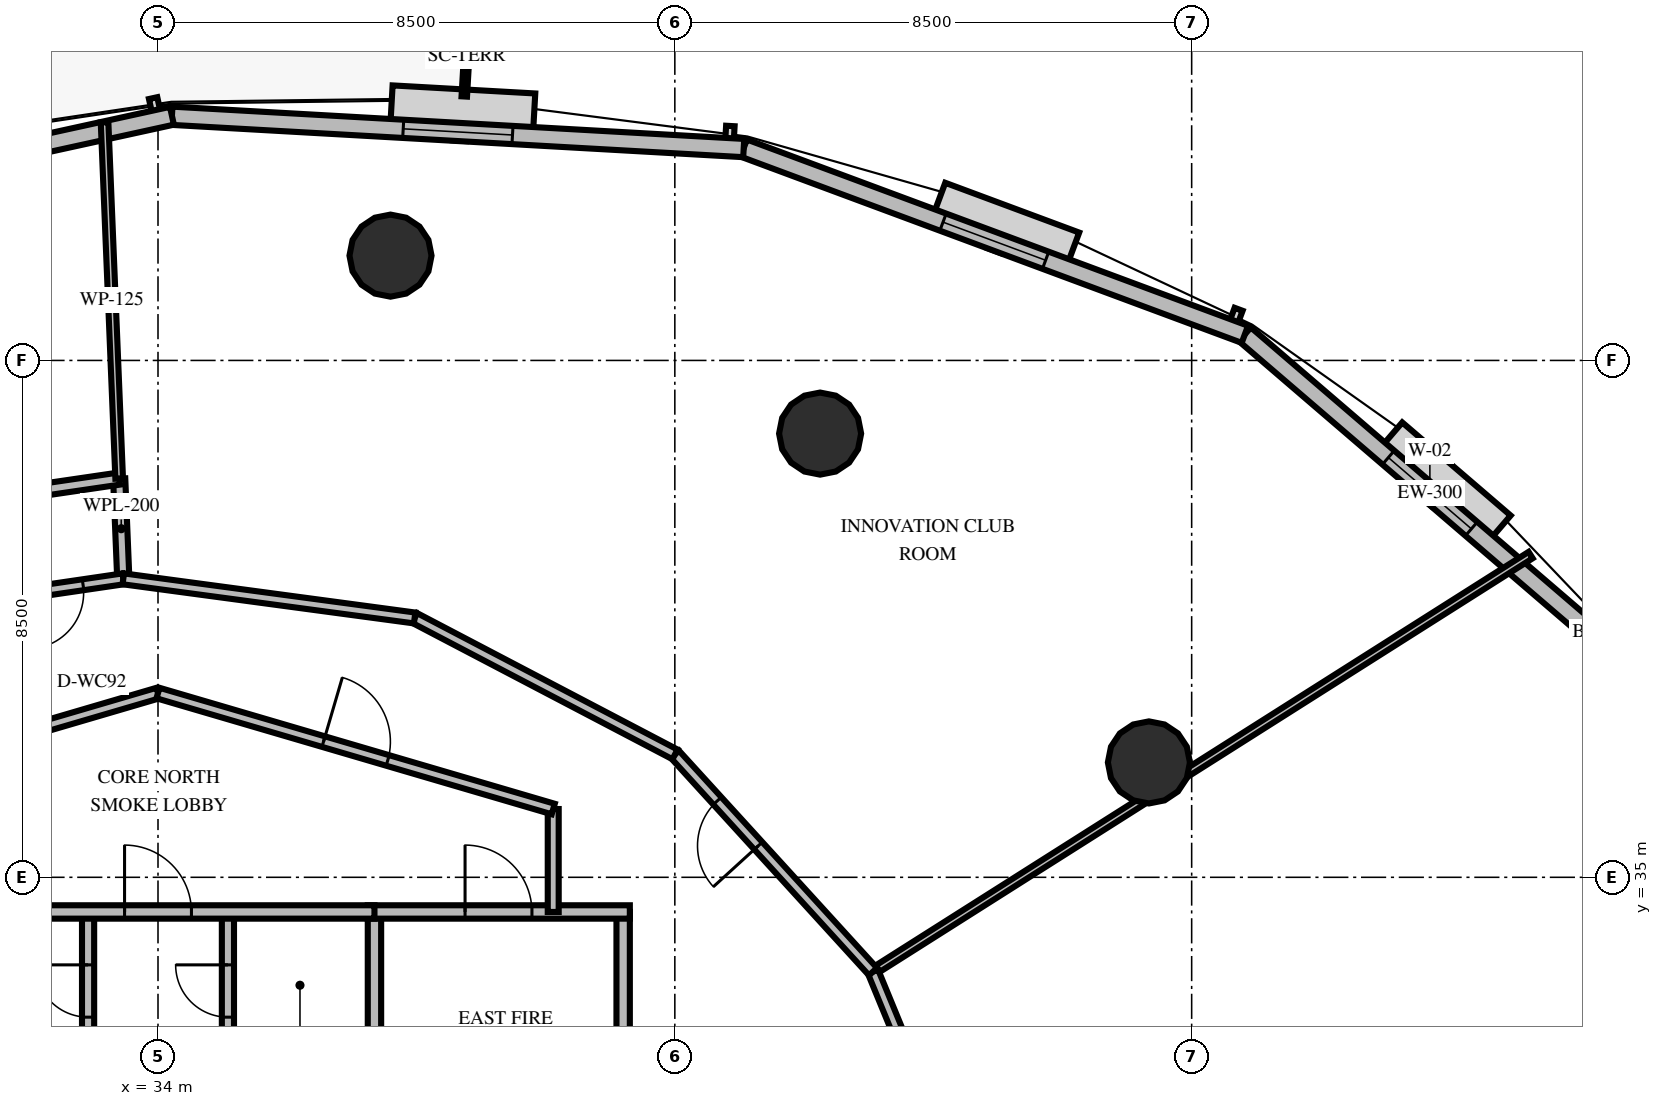
"""IFC4 building model, lengths in metres.
Left out: names, types, materials, properties, quantities, classifications, styles, units other than length and angle.
Written with IfcOpenShell. Run it as: python <this file> out.ifc"""

import sys

from ifc_helpers import new_model, si_unit, direction, frame, frame_2d, origin, origin_2d, place, context, subcontext, project, spatial, rectangle, circle, extrude, element, fill, save


model = new_model("IFC4")
c1 = context("Model", 3, precision=1e-05, world=origin(), true_north=direction((0.0, 1.0)))
c2 = subcontext(c1, "Body", "Model", "MODEL_VIEW")
j1 = project(units=[si_unit("LENGTHUNIT", "METRE"), si_unit("PLANEANGLEUNIT", "RADIAN")], contexts=[c1])
p1 = place(None, origin())
s1 = spatial("IfcSite", under=j1, at=p1, CompositionType="ELEMENT")
p2 = place(p1, origin())
s2 = spatial("IfcBuilding", under=s1, at=p2, CompositionType="ELEMENT")
p3 = place(p2, frame((0.0, 0.0, 84.6)))
s3 = spatial("IfcBuildingStorey", under=s2, at=p3, CompositionType="ELEMENT", Elevation=84.6)
for number, where, z_axis, x_axis in (
    (1, (50.297, 36.889, 0.0), (0.0, 0.0, 1.0), (1.0, 0.0, 0.0)),
    (2, (44.889, 42.297, 0.0), (0.0, 0.0, 1.0), (1.0, 0.0, 0.0)),
    (3, (37.824, 45.223, 0.0), (0.0, 0.0, 1.0), (1.0, 0.0, 0.0)),
):
    element("IfcColumn", number, at=place(p3, frame(where, z_axis=z_axis, x_axis=x_axis)), inside=s3, PredefinedType="COLUMN", context=c2, shape_type="SweptSolid", body=[
        extrude(circle(Radius=0.675, at=origin_2d()), origin(), (0.0, 0.0, 1.0), 4.2),
    ])
p4 = place(p3, frame((57.961, 38.704, 0.0), z_axis=(0.0, 0.0, 1.0), x_axis=(-0.758684823953, 0.651457855815, 0.0)))
e4 = element("IfcWall", 4, at=p4, inside=s3, PredefinedType="SOLIDWALL", context=c2, shape_type="SweptSolid", body=[
    extrude(rectangle(XDim=8.021, YDim=0.3, at=frame_2d((4.011, 0.0))), origin(), (0.0, 0.0, 1.0), 2.96),
])
p5 = place(p4, frame((3.111, 0.0, 0.8)))
e5 = element("IfcOpeningElement", 5, at=p5, cuts=e4, PredefinedType="OPENING", context=c2, shape_type="SweptSolid", body=[
    extrude(rectangle(XDim=1.8, YDim=1.95, at=frame_2d((0.9, 0.975))), frame((0.0, 0.16, 0.0), z_axis=(0.0, -1.0, 0.0), x_axis=(1.0, 0.0, 0.0)), (0.0, 0.0, 1.0), 0.32),
])
p6 = place(p3, frame((51.875, 43.929, 0.0), z_axis=(0.0, 0.0, 1.0), x_axis=(-0.937362334375, 0.348355930184, 0.0)))
e6 = element("IfcWall", 6, at=p6, inside=s3, PredefinedType="SOLIDWALL", context=c2, shape_type="SweptSolid", body=[
    extrude(rectangle(XDim=8.793, YDim=0.3, at=frame_2d((4.396, 0.0))), origin(), (0.0, 0.0, 1.0), 2.96),
])
p7 = place(p6, frame((3.496, 0.0, 0.8)))
e7 = element("IfcOpeningElement", 7, at=p7, cuts=e6, PredefinedType="OPENING", context=c2, shape_type="SweptSolid", body=[
    extrude(rectangle(XDim=1.8, YDim=1.95, at=frame_2d((0.9, 0.975))), frame((0.0, 0.16, 0.0), z_axis=(0.0, -1.0, 0.0), x_axis=(1.0, 0.0, 0.0)), (0.0, 0.0, 1.0), 0.32),
])
p8 = place(p3, frame((43.633, 46.992, 0.0), z_axis=(0.0, 0.0, 1.0), x_axis=(-0.998409535383, 0.056377297353, 0.0)))
e8 = element("IfcWall", 8, at=p8, inside=s3, PredefinedType="SOLIDWALL", context=c2, shape_type="SweptSolid", body=[
    extrude(rectangle(XDim=9.419, YDim=0.3, at=frame_2d((4.709, 0.0))), origin(), (0.0, 0.0, 1.0), 2.96),
])
p9 = place(p8, frame((3.809, 0.0, 0.8)))
e9 = element("IfcOpeningElement", 9, at=p9, cuts=e8, PredefinedType="OPENING", context=c2, shape_type="SweptSolid", body=[
    extrude(rectangle(XDim=1.8, YDim=1.95, at=frame_2d((0.9, 0.975))), frame((0.0, 0.16, 0.0), z_axis=(0.0, -1.0, 0.0), x_axis=(1.0, 0.0, 0.0)), (0.0, 0.0, 1.0), 0.32),
])
p10 = place(p3, frame((34.229, 47.523, 0.0), z_axis=(0.0, 0.0, 1.0), x_axis=(-0.97686057385, -0.213877112516, 0.0)))
e10 = element("IfcWall", 10, at=p10, inside=s3, PredefinedType="SOLIDWALL", context=c2, shape_type="SweptSolid", body=[
    extrude(rectangle(XDim=9.655, YDim=0.3, at=frame_2d((4.827, 0.0))), origin(), (0.0, 0.0, 1.0), 2.96),
])
p11 = place(p10, frame((8.03, 0.0, 0.0)))
e11 = element("IfcOpeningElement", 11, at=p11, cuts=e10, PredefinedType="OPENING", context=c2, shape_type="SweptSolid", body=[
    extrude(rectangle(XDim=1.05, YDim=2.15, at=frame_2d((0.525, 1.075))), frame((0.0, 0.16, 0.0), z_axis=(0.0, -1.0, 0.0), x_axis=(1.0, 0.0, 0.0)), (0.0, 0.0, 1.0), 0.32),
])
p12 = place(p3, frame((32.85, 30.05, 0.0), z_axis=(0.0, 0.0, 1.0), x_axis=(0.0, 1.0, 0.0)))
e12 = element("IfcWall", 12, at=p12, inside=s3, PredefinedType="SOLIDWALL", context=c2, shape_type="SweptSolid", body=[
    extrude(rectangle(XDim=4.38, YDim=0.2, at=frame_2d((2.19, 0.0))), origin(), (0.0, 0.0, 1.0), 2.96),
])
p13 = place(p12, frame((2.65, 0.0, 0.0)))
e13 = element("IfcOpeningElement", 13, at=p13, cuts=e12, PredefinedType="OPENING", context=c2, shape_type="SweptSolid", body=[
    extrude(rectangle(XDim=0.86, YDim=2.05, at=frame_2d((0.43, 1.025))), frame((0.0, 0.11, 0.0), z_axis=(0.0, -1.0, 0.0), x_axis=(1.0, 0.0, 0.0)), (0.0, 0.0, 1.0), 0.22),
])
p14 = place(p3, frame((37.56, 30.05, 0.0), z_axis=(0.0, 0.0, 1.0), x_axis=(0.0, 1.0, 0.0)))
e14 = element("IfcWall", 14, at=p14, inside=s3, PredefinedType="SOLIDWALL", context=c2, shape_type="SweptSolid", body=[
    extrude(rectangle(XDim=4.38, YDim=0.22, at=frame_2d((2.19, 0.0))), origin(), (0.0, 0.0, 1.0), 2.96),
])
p15 = place(p14, frame((0.8, 0.0, 0.0)))
e15 = element("IfcOpeningElement", 15, at=p15, cuts=e14, PredefinedType="OPENING", context=c2, shape_type="SweptSolid", body=[
    extrude(rectangle(XDim=1.05, YDim=2.1, at=frame_2d((0.525, 1.05))), frame((0.0, 0.12, 0.0), z_axis=(0.0, -1.0, 0.0), x_axis=(1.0, 0.0, 0.0)), (0.0, 0.0, 1.0), 0.24),
])
p16 = place(p3, frame((41.65, 30.05, 0.0), z_axis=(0.0, 0.0, 1.0), x_axis=(0.0, 1.0, 0.0)))
e16 = element("IfcWall", 16, at=p16, inside=s3, PredefinedType="SOLIDWALL", context=c2, shape_type="SweptSolid", body=[
    extrude(rectangle(XDim=4.38, YDim=0.22, at=frame_2d((2.19, 0.0))), origin(), (0.0, 0.0, 1.0), 2.96),
])
p17 = place(p3, frame((37.45, 34.43, 0.0), z_axis=(0.0, 0.0, 1.0), x_axis=(1.0, 0.0, 0.0)))
e17 = element("IfcWall", 17, at=p17, inside=s3, PredefinedType="SOLIDWALL", context=c2, shape_type="SweptSolid", body=[
    extrude(rectangle(XDim=4.31, YDim=0.22, at=frame_2d((2.155, 0.0))), origin(), (0.0, 0.0, 1.0), 2.96),
])
p18 = place(p17, frame((1.6, 0.0, 0.0)))
e18 = element("IfcOpeningElement", 18, at=p18, cuts=e17, PredefinedType="OPENING", context=c2, shape_type="SweptSolid", body=[
    extrude(rectangle(XDim=1.1, YDim=2.15, at=frame_2d((0.55, 1.075))), frame((0.0, 0.12, 0.0), z_axis=(0.0, -1.0, 0.0), x_axis=(1.0, 0.0, 0.0)), (0.0, 0.0, 1.0), 0.24),
])
p19 = place(p3, frame((35.15, 30.05, 0.0), z_axis=(0.0, 0.0, 1.0), x_axis=(0.0, 1.0, 0.0)))
e19 = element("IfcWall", 19, at=p19, inside=s3, PredefinedType="SOLIDWALL", context=c2, shape_type="SweptSolid", body=[
    extrude(rectangle(XDim=4.38, YDim=0.2, at=frame_2d((2.19, 0.0))), origin(), (0.0, 0.0, 1.0), 2.96),
])
p20 = place(p19, frame((2.65, 0.0, 0.0)))
e20 = element("IfcOpeningElement", 20, at=p20, cuts=e19, PredefinedType="OPENING", context=c2, shape_type="SweptSolid", body=[
    extrude(rectangle(XDim=0.86, YDim=2.05, at=frame_2d((0.43, 1.025))), frame((0.0, 0.11, 0.0), z_axis=(0.0, -1.0, 0.0), x_axis=(1.0, 0.0, 0.0)), (0.0, 0.0, 1.0), 0.22),
])
p21 = place(p3, frame((30.44, 34.43, 0.0), z_axis=(0.0, 0.0, 1.0), x_axis=(1.0, 0.0, 0.0)))
e21 = element("IfcWall", 21, at=p21, inside=s3, PredefinedType="SOLIDWALL", context=c2, shape_type="SweptSolid", body=[
    extrude(rectangle(XDim=7.12, YDim=0.22, at=frame_2d((3.56, 0.0))), origin(), (0.0, 0.0, 1.0), 2.96),
])
p22 = place(p21, frame((3.01, 0.0, 0.0)))
e22 = element("IfcOpeningElement", 22, at=p22, cuts=e21, PredefinedType="OPENING", context=c2, shape_type="SweptSolid", body=[
    extrude(rectangle(XDim=1.1, YDim=2.15, at=frame_2d((0.55, 1.075))), frame((0.0, 0.12, 0.0), z_axis=(0.0, -1.0, 0.0), x_axis=(1.0, 0.0, 0.0)), (0.0, 0.0, 1.0), 0.24),
])
p23 = place(p3, frame((40.5, 36.123, 0.0), z_axis=(0.0, 0.0, 1.0), x_axis=(0.0, -1.0, 0.0)))
e23 = element("IfcWall", 23, at=p23, inside=s3, PredefinedType="PARTITIONING", context=c2, shape_type="SweptSolid", body=[
    extrude(rectangle(XDim=1.693, YDim=0.18, at=frame_2d((0.846, 0.0))), origin(), (0.0, 0.0, 1.0), 2.96),
])
p24 = place(p3, frame((27.5, 36.123, 0.0), z_axis=(0.0, 0.0, 1.0), x_axis=(0.959546654541, 0.281549671923, 0.0)))
e24 = element("IfcWall", 24, at=p24, inside=s3, PredefinedType="PARTITIONING", context=c2, shape_type="SweptSolid", body=[
    extrude(rectangle(XDim=6.774, YDim=0.18, at=frame_2d((3.387, 0.0))), origin(), (0.0, 0.0, 1.0), 2.96),
])
p25 = place(p24, frame((2.837, 0.0, 0.0)))
e25 = element("IfcOpeningElement", 25, at=p25, cuts=e24, PredefinedType="OPENING", context=c2, shape_type="SweptSolid", body=[
    extrude(rectangle(XDim=1.1, YDim=2.15, at=frame_2d((0.55, 1.075))), frame((0.0, 0.1, 0.0), z_axis=(0.0, -1.0, 0.0), x_axis=(1.0, 0.0, 0.0)), (0.0, 0.0, 1.0), 0.2),
])
p26 = place(p3, frame((34.0, 38.03, 0.0), z_axis=(0.0, 0.0, 1.0), x_axis=(0.959546654541, -0.281549671923, 0.0)))
e26 = element("IfcWall", 26, at=p26, inside=s3, PredefinedType="PARTITIONING", context=c2, shape_type="SweptSolid", body=[
    extrude(rectangle(XDim=6.774, YDim=0.18, at=frame_2d((3.387, 0.0))), origin(), (0.0, 0.0, 1.0), 2.96),
])
p27 = place(p26, frame((2.837, 0.0, 0.0)))
e27 = element("IfcOpeningElement", 27, at=p27, cuts=e26, PredefinedType="OPENING", context=c2, shape_type="SweptSolid", body=[
    extrude(rectangle(XDim=1.1, YDim=2.15, at=frame_2d((0.55, 1.075))), frame((0.0, 0.1, 0.0), z_axis=(0.0, -1.0, 0.0), x_axis=(1.0, 0.0, 0.0)), (0.0, 0.0, 1.0), 0.2),
])
p28 = place(p3, frame((33.429, 39.908, 0.0), z_axis=(0.0, 0.0, 1.0), x_axis=(-0.040984341999, 0.999159788878, 0.0)))
e28 = element("IfcWall", 28, at=p28, inside=s3, PredefinedType="PLUMBINGWALL", context=c2, shape_type="SweptSolid", body=[
    extrude(rectangle(XDim=1.65, YDim=0.2, at=frame_2d((0.825, 0.0))), origin(), (0.0, 0.0, 1.0), 2.96),
])
p29 = place(p3, frame((33.362, 41.557, 0.0), z_axis=(0.0, 0.0, 1.0), x_axis=(-0.989400694213, -0.145211109392, 0.0)))
e29 = element("IfcWall", 29, at=p29, inside=s3, PredefinedType="PLUMBINGWALL", context=c2, shape_type="SweptSolid", body=[
    extrude(rectangle(XDim=3.255, YDim=0.2, at=frame_2d((1.627, 0.0))), origin(), (0.0, 0.0, 1.0), 2.96),
])
p30 = place(p3, frame((33.429, 39.908, 0.0), z_axis=(0.0, 0.0, 1.0), x_axis=(-0.989398525704, -0.145225883829, 0.0)))
e30 = element("IfcWall", 30, at=p30, inside=s3, PredefinedType="PARTITIONING", context=c2, shape_type="SweptSolid", body=[
    extrude(rectangle(XDim=2.91, YDim=0.18, at=frame_2d((1.455, 0.0))), origin(), (0.0, 0.0, 1.0), 2.96),
])
p31 = place(p30, frame((0.669, 0.0, 0.0)))
e31 = element("IfcOpeningElement", 31, at=p31, cuts=e30, PredefinedType="OPENING", context=c2, shape_type="SweptSolid", body=[
    extrude(rectangle(XDim=0.92, YDim=2.1, at=frame_2d((0.46, 1.05))), frame((0.0, 0.1, 0.0), z_axis=(0.0, -1.0, 0.0), x_axis=(1.0, 0.0, 0.0)), (0.0, 0.0, 1.0), 0.2),
])
p32 = place(p3, frame((33.362, 41.557, 0.0), z_axis=(0.0, 0.0, 1.0), x_axis=(-0.041010556403, 0.99915871325, 0.0)))
e32 = element("IfcWall", 32, at=p32, inside=s3, PredefinedType="PARTITIONING", context=c2, shape_type="SweptSolid", body=[
    extrude(rectangle(XDim=5.864, YDim=0.125, at=frame_2d((2.932, 0.0))), origin(), (0.0, 0.0, 1.0), 2.96),
])
p33 = place(p3, frame((45.76, 33.448, 0.0), z_axis=(0.0, 0.0, 1.0), x_axis=(0.844793501384, 0.535092459318, 0.0)))
e33 = element("IfcWall", 33, at=p33, inside=s3, PredefinedType="PARTITIONING", context=c2, shape_type="SweptSolid", body=[
    extrude(rectangle(XDim=12.802, YDim=0.125, at=frame_2d((6.401, 0.0))), origin(), (0.0, 0.0, 1.0), 2.96),
])
p34 = place(p3, frame((47.598, 28.977, 0.0), z_axis=(0.0, 0.0, 1.0), x_axis=(-0.380272236521, 0.924874600219, 0.0)))
e34 = element("IfcWall", 34, at=p34, inside=s3, PredefinedType="PARTITIONING", context=c2, shape_type="SweptSolid", body=[
    extrude(rectangle(XDim=4.834, YDim=0.18, at=frame_2d((2.417, 0.0))), origin(), (0.0, 0.0, 1.0), 2.96),
])
p35 = place(p34, frame((1.917, 0.0, 0.0)))
e35 = element("IfcOpeningElement", 35, at=p35, cuts=e34, PredefinedType="OPENING", context=c2, shape_type="SweptSolid", body=[
    extrude(rectangle(XDim=1.0, YDim=2.15, at=frame_2d((0.5, 1.075))), frame((0.0, 0.1, 0.0), z_axis=(0.0, -1.0, 0.0), x_axis=(1.0, 0.0, 0.0)), (0.0, 0.0, 1.0), 0.2),
])
p36 = place(p3, frame((45.76, 33.448, 0.0), z_axis=(0.0, 0.0, 1.0), x_axis=(-0.673677614221, 0.739025352811, 0.0)))
e36 = element("IfcWall", 36, at=p36, inside=s3, PredefinedType="PARTITIONING", context=c2, shape_type="SweptSolid", body=[
    extrude(rectangle(XDim=4.834, YDim=0.18, at=frame_2d((2.417, 0.0))), origin(), (0.0, 0.0, 1.0), 2.96),
])
p37 = place(p36, frame((2.801, 0.0, 0.0)))
e37 = element("IfcOpeningElement", 37, at=p37, cuts=e36, PredefinedType="OPENING", context=c2, shape_type="SweptSolid", body=[
    extrude(rectangle(XDim=1.0, YDim=2.15, at=frame_2d((0.5, 1.075))), frame((0.0, 0.1, 0.0), z_axis=(0.0, -1.0, 0.0), x_axis=(1.0, 0.0, 0.0)), (0.0, 0.0, 1.0), 0.2),
])
p38 = place(p3, frame((42.503, 37.021, 0.0), z_axis=(0.0, 0.0, 1.0), x_axis=(-0.885791991461, 0.464082479591, 0.0)))
e38 = element("IfcWall", 38, at=p38, inside=s3, PredefinedType="PARTITIONING", context=c2, shape_type="SweptSolid", body=[
    extrude(rectangle(XDim=4.834, YDim=0.18, at=frame_2d((2.417, 0.0))), origin(), (0.0, 0.0, 1.0), 2.96),
])
p39 = place(p3, frame((38.221, 39.265, 0.0), z_axis=(0.0, 0.0, 1.0), x_axis=(-0.991100422672, 0.133116310719, 0.0)))
e39 = element("IfcWall", 39, at=p39, inside=s3, PredefinedType="PARTITIONING", context=c2, shape_type="SweptSolid", body=[
    extrude(rectangle(XDim=4.834, YDim=0.18, at=frame_2d((2.417, 0.0))), origin(), (0.0, 0.0, 1.0), 2.96),
])
p40 = place(p5, origin())
e40 = element("IfcWindow", 40, at=p40, inside=s3, PartitioningType="SINGLE_PANEL", PredefinedType="WINDOW", context=c2, shape_type="SweptSolid", body=[
    extrude(rectangle(XDim=1.8, YDim=1.95, at=frame_2d((0.9, 0.975))), frame((0.0, 0.03, 0.0), z_axis=(0.0, -1.0, 0.0), x_axis=(1.0, 0.0, 0.0)), (0.0, 0.0, 1.0), 0.06),
])
fill(e5, e40)
p41 = place(p7, origin())
e41 = element("IfcWindow", 41, at=p41, inside=s3, PartitioningType="SINGLE_PANEL", PredefinedType="WINDOW", context=c2, shape_type="SweptSolid", body=[
    extrude(rectangle(XDim=1.8, YDim=1.95, at=frame_2d((0.9, 0.975))), frame((0.0, 0.03, 0.0), z_axis=(0.0, -1.0, 0.0), x_axis=(1.0, 0.0, 0.0)), (0.0, 0.0, 1.0), 0.06),
])
fill(e7, e41)
p42 = place(p9, origin())
e42 = element("IfcWindow", 42, at=p42, inside=s3, PartitioningType="SINGLE_PANEL", PredefinedType="WINDOW", context=c2, shape_type="SweptSolid", body=[
    extrude(rectangle(XDim=1.8, YDim=1.95, at=frame_2d((0.9, 0.975))), frame((0.0, 0.03, 0.0), z_axis=(0.0, -1.0, 0.0), x_axis=(1.0, 0.0, 0.0)), (0.0, 0.0, 1.0), 0.06),
])
fill(e9, e42)
p43 = place(p13, origin())
e43 = element("IfcDoor", 43, at=p43, inside=s3, OperationType="SINGLE_SWING_RIGHT", PredefinedType="TRAPDOOR", context=c2, shape_type="SweptSolid", body=[
    extrude(rectangle(XDim=0.86, YDim=2.05, at=frame_2d((0.43, 1.025))), frame((0.0, 0.025, 0.0), z_axis=(0.0, -1.0, 0.0), x_axis=(1.0, 0.0, 0.0)), (0.0, 0.0, 1.0), 0.05),
])
fill(e13, e43)
p44 = place(p18, origin())
e44 = element("IfcDoor", 44, at=p44, inside=s3, OperationType="SINGLE_SWING_LEFT", PredefinedType="DOOR", context=c2, shape_type="SweptSolid", body=[
    extrude(rectangle(XDim=1.1, YDim=2.15, at=frame_2d((0.55, 1.075))), frame((0.0, 0.025, 0.0), z_axis=(0.0, -1.0, 0.0), x_axis=(1.0, 0.0, 0.0)), (0.0, 0.0, 1.0), 0.05),
])
fill(e18, e44)
p45 = place(p20, origin())
e45 = element("IfcDoor", 45, at=p45, inside=s3, OperationType="SINGLE_SWING_RIGHT", PredefinedType="TRAPDOOR", context=c2, shape_type="SweptSolid", body=[
    extrude(rectangle(XDim=0.86, YDim=2.05, at=frame_2d((0.43, 1.025))), frame((0.0, 0.025, 0.0), z_axis=(0.0, -1.0, 0.0), x_axis=(1.0, 0.0, 0.0)), (0.0, 0.0, 1.0), 0.05),
])
fill(e20, e45)
p46 = place(p22, origin())
e46 = element("IfcDoor", 46, at=p46, inside=s3, OperationType="SINGLE_SWING_LEFT", PredefinedType="DOOR", context=c2, shape_type="SweptSolid", body=[
    extrude(rectangle(XDim=1.1, YDim=2.15, at=frame_2d((0.55, 1.075))), frame((0.0, 0.025, 0.0), z_axis=(0.0, -1.0, 0.0), x_axis=(1.0, 0.0, 0.0)), (0.0, 0.0, 1.0), 0.05),
])
fill(e22, e46)
p47 = place(p27, origin())
e47 = element("IfcDoor", 47, at=p47, inside=s3, OperationType="SINGLE_SWING_LEFT", PredefinedType="DOOR", context=c2, shape_type="SweptSolid", body=[
    extrude(rectangle(XDim=1.1, YDim=2.15, at=frame_2d((0.55, 1.075))), frame((0.0, 0.025, 0.0), z_axis=(0.0, -1.0, 0.0), x_axis=(1.0, 0.0, 0.0)), (0.0, 0.0, 1.0), 0.05),
])
fill(e27, e47)
p48 = place(p31, origin())
e48 = element("IfcDoor", 48, at=p48, inside=s3, OperationType="SINGLE_SWING_RIGHT", PredefinedType="DOOR", context=c2, shape_type="SweptSolid", body=[
    extrude(rectangle(XDim=0.92, YDim=2.1, at=frame_2d((0.46, 1.05))), frame((0.0, 0.025, 0.0), z_axis=(0.0, -1.0, 0.0), x_axis=(1.0, 0.0, 0.0)), (0.0, 0.0, 1.0), 0.05),
])
fill(e31, e48)
p49 = place(p37, origin())
e49 = element("IfcDoor", 49, at=p49, inside=s3, OperationType="SINGLE_SWING_LEFT", PredefinedType="DOOR", context=c2, shape_type="SweptSolid", body=[
    extrude(rectangle(XDim=1.0, YDim=2.15, at=frame_2d((0.5, 1.075))), frame((0.0, 0.025, 0.0), z_axis=(0.0, -1.0, 0.0), x_axis=(1.0, 0.0, 0.0)), (0.0, 0.0, 1.0), 0.05),
])
fill(e37, e49)
save(model, sys.argv[1])
